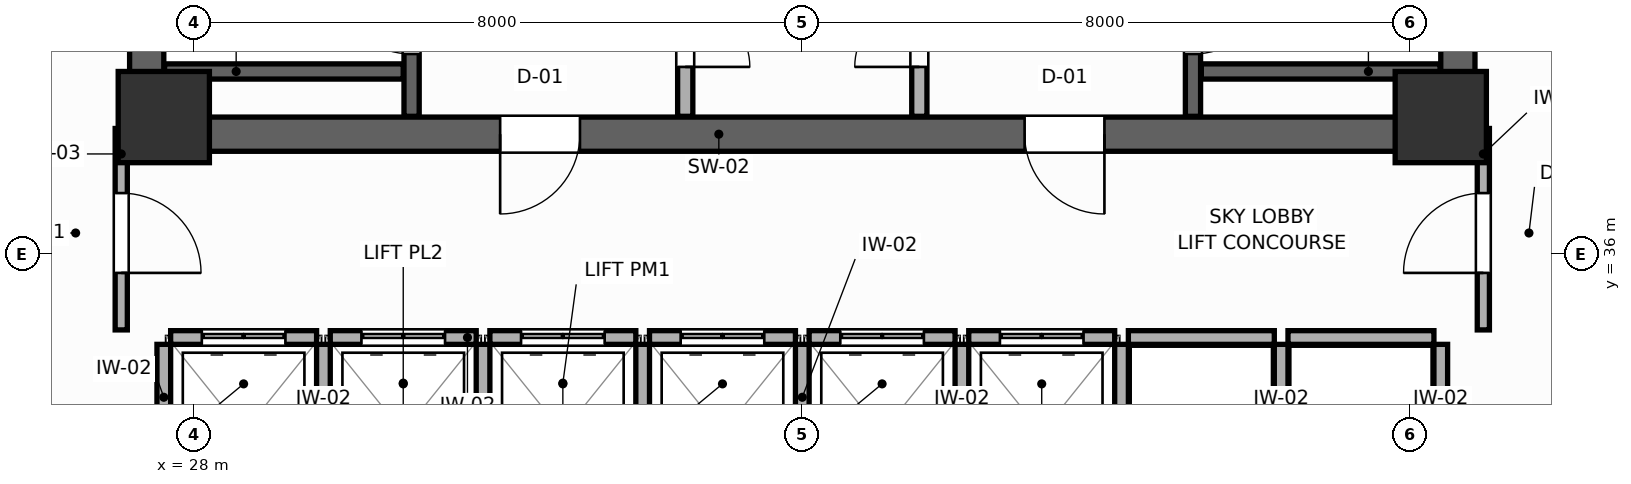
"""IFC4 building model, lengths in metres.
Left out: names, types, materials, properties, quantities, classifications, styles, units other than length and angle.
Written with IfcOpenShell. Run it as: python <this file> out.ifc"""

import sys

from ifc_helpers import new_model, si_unit, direction, frame, frame_2d, origin, origin_2d, place, context, subcontext, project, spatial, rectangle, extrude, source, transform, mapped, element, fill, save


model = new_model("IFC4")
c1 = context("Model", 3, precision=1e-05, world=origin(), true_north=direction((0.0, 1.0)))
c2 = subcontext(c1, "Body", "Model", "MODEL_VIEW")
j1 = project(units=[si_unit("LENGTHUNIT", "METRE"), si_unit("PLANEANGLEUNIT", "RADIAN")], contexts=[c1])
p1 = place(None, origin())
s1 = spatial("IfcSite", under=j1, at=p1, CompositionType="ELEMENT")
p2 = place(p1, origin())
s2 = spatial("IfcBuilding", under=s1, at=p2, CompositionType="ELEMENT")
p3 = place(p2, frame((0.0, 0.0, 99.0)))
s3 = spatial("IfcBuildingStorey", under=s2, at=p3, CompositionType="ELEMENT", Elevation=99.0)
p4 = place(p3, frame((27.15, 37.575, 0.0), z_axis=(0.0, 0.0, 1.0), x_axis=(1.0, 0.0, 0.0)))
e1 = element("IfcWall", 1, at=p4, inside=s3, PredefinedType="SHEAR", context=c2, shape_type="SweptSolid", body=[
    extrude(rectangle(XDim=17.7, YDim=0.45, at=frame_2d((8.85, 0.0))), origin(), (0.0, 0.0, 1.0), 3.6),
])
p5 = place(p4, frame((4.875, 0.0, 0.0)))
e2 = element("IfcOpeningElement", 2, at=p5, cuts=e1, PredefinedType="OPENING", context=c2, shape_type="SweptSolid", body=[
    extrude(rectangle(XDim=1.05, YDim=2.1, at=frame_2d((0.525, 1.05))), frame((0.0, 0.235, 0.0), z_axis=(0.0, -1.0, 0.0), x_axis=(1.0, 0.0, 0.0)), (0.0, 0.0, 1.0), 0.47),
])
p6 = place(p4, frame((11.775, 0.0, 0.0)))
e3 = element("IfcOpeningElement", 3, at=p6, cuts=e1, PredefinedType="OPENING", context=c2, shape_type="SweptSolid", body=[
    extrude(rectangle(XDim=1.05, YDim=2.1, at=frame_2d((0.525, 1.05))), frame((0.0, 0.235, 0.0), z_axis=(0.0, -1.0, 0.0), x_axis=(1.0, 0.0, 0.0)), (0.0, 0.0, 1.0), 0.47),
])
for number, where, z_axis, x_axis in (
    (4, (27.375, 37.8, 0.0), (0.0, 0.0, 1.0), (0.0, 1.0, 0.0)),
    (5, (44.625, 37.8, 0.0), (0.0, 0.0, 1.0), (0.0, 1.0, 0.0)),
):
    element("IfcWall", number, at=place(p3, frame(where, z_axis=z_axis, x_axis=x_axis)), inside=s3, PredefinedType="SHEAR", context=c2, shape_type="SweptSolid", body=[
        extrude(rectangle(XDim=9.0, YDim=0.45, at=frame_2d((4.5, 0.0))), origin(), (0.0, 0.0, 1.0), 3.6),
    ])
m1 = source(origin(), c2, "Body", "SweptSolid", [
    extrude(rectangle(XDim=1.2, YDim=1.2, at=origin_2d()), origin(), (0.0, 0.0, 1.0), 3.6),
])
for number, where, z_axis, x_axis in (
    (6, (27.6, 37.8, 0.0), (0.0, 0.0, 1.0), (1.0, 0.0, 0.0)),
    (7, (44.4, 37.8, 0.0), (0.0, 0.0, 1.0), (1.0, 0.0, 0.0)),
):
    element("IfcColumn", number, at=place(p3, frame(where, z_axis=z_axis, x_axis=x_axis)), inside=s3, PredefinedType="COLUMN", context=c2, shape_type="MappedRepresentation", body=[
        mapped(m1, transform((0.0, 0.0, 0.0), scale=1.0)),
    ])
p7 = place(p3, frame((30.86, 37.81, 0.0), z_axis=(0.0, 0.0, 1.0), x_axis=(0.0, 1.0, 0.0)))
e8 = element("IfcWall", 8, at=p7, inside=s3, PredefinedType="SHEAR", context=c2, shape_type="SweptSolid", body=[
    extrude(rectangle(XDim=8.98, YDim=0.2, at=frame_2d((4.49, 0.0))), origin(), (0.0, 0.0, 1.0), 3.6),
])
p8 = place(p7, frame((0.82, 0.0, 0.0)))
e9 = element("IfcOpeningElement", 9, at=p8, cuts=e8, PredefinedType="OPENING", context=c2, shape_type="SweptSolid", body=[
    extrude(rectangle(XDim=1.05, YDim=2.1, at=frame_2d((0.525, 1.05))), frame((0.0, 0.11, 0.0), z_axis=(0.0, -1.0, 0.0), x_axis=(1.0, 0.0, 0.0)), (0.0, 0.0, 1.0), 0.22),
])
p9 = place(p3, frame((27.61, 38.4, 0.0), z_axis=(0.0, 0.0, 1.0), x_axis=(1.0, 0.0, 0.0)))
e10 = element("IfcWall", 10, at=p9, inside=s3, PredefinedType="SHEAR", context=c2, shape_type="SweptSolid", body=[
    extrude(rectangle(XDim=3.14, YDim=0.2, at=frame_2d((1.57, 0.0))), origin(), (0.0, 0.0, 1.0), 3.6),
])
p10 = place(p3, frame((41.14, 37.81, 0.0), z_axis=(0.0, 0.0, 1.0), x_axis=(0.0, 1.0, 0.0)))
e11 = element("IfcWall", 11, at=p10, inside=s3, PredefinedType="SHEAR", context=c2, shape_type="SweptSolid", body=[
    extrude(rectangle(XDim=8.98, YDim=0.2, at=frame_2d((4.49, 0.0))), origin(), (0.0, 0.0, 1.0), 3.6),
])
p11 = place(p10, frame((0.82, 0.0, 0.0)))
e12 = element("IfcOpeningElement", 12, at=p11, cuts=e11, PredefinedType="OPENING", context=c2, shape_type="SweptSolid", body=[
    extrude(rectangle(XDim=1.05, YDim=2.1, at=frame_2d((0.525, 1.05))), frame((0.0, 0.11, 0.0), z_axis=(0.0, -1.0, 0.0), x_axis=(1.0, 0.0, 0.0)), (0.0, 0.0, 1.0), 0.22),
])
p12 = place(p3, frame((41.25, 38.4, 0.0), z_axis=(0.0, 0.0, 1.0), x_axis=(1.0, 0.0, 0.0)))
e13 = element("IfcWall", 13, at=p12, inside=s3, PredefinedType="SHEAR", context=c2, shape_type="SweptSolid", body=[
    extrude(rectangle(XDim=3.14, YDim=0.2, at=frame_2d((1.57, 0.0))), origin(), (0.0, 0.0, 1.0), 3.6),
])
p13 = place(p3, frame((34.46, 37.81, 0.0), z_axis=(0.0, 0.0, 1.0), x_axis=(0.0, 1.0, 0.0)))
e14 = element("IfcWall", 14, at=p13, inside=s3, PredefinedType="PARTITIONING", context=c2, shape_type="SweptSolid", body=[
    extrude(rectangle(XDim=8.98, YDim=0.2, at=frame_2d((4.49, 0.0))), origin(), (0.0, 0.0, 1.0), 3.4),
])
p14 = place(p13, frame((0.65, 0.0, 0.0)))
e15 = element("IfcOpeningElement", 15, at=p14, cuts=e14, PredefinedType="OPENING", context=c2, shape_type="SweptSolid", body=[
    extrude(rectangle(XDim=0.85, YDim=2.05, at=frame_2d((0.425, 1.025))), frame((0.0, 0.11, 0.0), z_axis=(0.0, -1.0, 0.0), x_axis=(1.0, 0.0, 0.0)), (0.0, 0.0, 1.0), 0.22),
])
p15 = place(p3, frame((37.54, 37.81, 0.0), z_axis=(0.0, 0.0, 1.0), x_axis=(0.0, 1.0, 0.0)))
e16 = element("IfcWall", 16, at=p15, inside=s3, PredefinedType="PARTITIONING", context=c2, shape_type="SweptSolid", body=[
    extrude(rectangle(XDim=8.98, YDim=0.2, at=frame_2d((4.49, 0.0))), origin(), (0.0, 0.0, 1.0), 3.4),
])
p16 = place(p15, frame((0.65, 0.0, 0.0)))
e17 = element("IfcOpeningElement", 17, at=p16, cuts=e16, PredefinedType="OPENING", context=c2, shape_type="SweptSolid", body=[
    extrude(rectangle(XDim=0.85, YDim=2.05, at=frame_2d((0.425, 1.025))), frame((0.0, 0.11, 0.0), z_axis=(0.0, -1.0, 0.0), x_axis=(1.0, 0.0, 0.0)), (0.0, 0.0, 1.0), 0.22),
])
p17 = place(p3, frame((27.69, 34.9, 0.0), z_axis=(0.0, 0.0, 1.0), x_axis=(1.0, 0.0, 0.0)))
e18 = element("IfcWall", 18, at=p17, inside=s3, PredefinedType="PARTITIONING", context=c2, shape_type="SweptSolid", body=[
    extrude(rectangle(XDim=1.92, YDim=0.18, at=frame_2d((0.96, 0.0))), origin(), (0.0, 0.0, 1.0), 3.4),
])
p18 = place(p17, frame((0.41, 0.0, 0.0)))
e19 = element("IfcOpeningElement", 19, at=p18, cuts=e18, PredefinedType="OPENING", context=c2, shape_type="SweptSolid", body=[
    extrude(rectangle(XDim=1.1, YDim=2.1, at=frame_2d((0.55, 1.05))), frame((0.0, 0.1, 0.0), z_axis=(0.0, -1.0, 0.0), x_axis=(1.0, 0.0, 0.0)), (0.0, 0.0, 1.0), 0.2),
])
p19 = place(p3, frame((27.6, 32.49, 0.0), z_axis=(0.0, 0.0, 1.0), x_axis=(0.0, 1.0, 0.0)))
e20 = element("IfcWall", 20, at=p19, inside=s3, PredefinedType="PARTITIONING", context=c2, shape_type="SweptSolid", body=[
    extrude(rectangle(XDim=2.32, YDim=0.18, at=frame_2d((1.16, 0.0))), origin(), (0.0, 0.0, 1.0), 3.4),
])
p20 = place(p3, frame((29.79, 34.9, 0.0), z_axis=(0.0, 0.0, 1.0), x_axis=(1.0, 0.0, 0.0)))
e21 = element("IfcWall", 21, at=p20, inside=s3, PredefinedType="PARTITIONING", context=c2, shape_type="SweptSolid", body=[
    extrude(rectangle(XDim=1.92, YDim=0.18, at=frame_2d((0.96, 0.0))), origin(), (0.0, 0.0, 1.0), 3.4),
])
p21 = place(p20, frame((0.41, 0.0, 0.0)))
e22 = element("IfcOpeningElement", 22, at=p21, cuts=e21, PredefinedType="OPENING", context=c2, shape_type="SweptSolid", body=[
    extrude(rectangle(XDim=1.1, YDim=2.1, at=frame_2d((0.55, 1.05))), frame((0.0, 0.1, 0.0), z_axis=(0.0, -1.0, 0.0), x_axis=(1.0, 0.0, 0.0)), (0.0, 0.0, 1.0), 0.2),
])
p22 = place(p3, frame((29.7, 32.49, 0.0), z_axis=(0.0, 0.0, 1.0), x_axis=(0.0, 1.0, 0.0)))
e23 = element("IfcWall", 23, at=p22, inside=s3, PredefinedType="PARTITIONING", context=c2, shape_type="SweptSolid", body=[
    extrude(rectangle(XDim=2.32, YDim=0.18, at=frame_2d((1.16, 0.0))), origin(), (0.0, 0.0, 1.0), 3.4),
])
p23 = place(p3, frame((31.89, 34.9, 0.0), z_axis=(0.0, 0.0, 1.0), x_axis=(1.0, 0.0, 0.0)))
e24 = element("IfcWall", 24, at=p23, inside=s3, PredefinedType="PARTITIONING", context=c2, shape_type="SweptSolid", body=[
    extrude(rectangle(XDim=1.92, YDim=0.18, at=frame_2d((0.96, 0.0))), origin(), (0.0, 0.0, 1.0), 3.4),
])
p24 = place(p23, frame((0.41, 0.0, 0.0)))
e25 = element("IfcOpeningElement", 25, at=p24, cuts=e24, PredefinedType="OPENING", context=c2, shape_type="SweptSolid", body=[
    extrude(rectangle(XDim=1.1, YDim=2.1, at=frame_2d((0.55, 1.05))), frame((0.0, 0.1, 0.0), z_axis=(0.0, -1.0, 0.0), x_axis=(1.0, 0.0, 0.0)), (0.0, 0.0, 1.0), 0.2),
])
p25 = place(p3, frame((31.8, 32.49, 0.0), z_axis=(0.0, 0.0, 1.0), x_axis=(0.0, 1.0, 0.0)))
e26 = element("IfcWall", 26, at=p25, inside=s3, PredefinedType="PARTITIONING", context=c2, shape_type="SweptSolid", body=[
    extrude(rectangle(XDim=2.32, YDim=0.18, at=frame_2d((1.16, 0.0))), origin(), (0.0, 0.0, 1.0), 3.4),
])
p26 = place(p3, frame((33.99, 34.9, 0.0), z_axis=(0.0, 0.0, 1.0), x_axis=(1.0, 0.0, 0.0)))
e27 = element("IfcWall", 27, at=p26, inside=s3, PredefinedType="PARTITIONING", context=c2, shape_type="SweptSolid", body=[
    extrude(rectangle(XDim=1.92, YDim=0.18, at=frame_2d((0.96, 0.0))), origin(), (0.0, 0.0, 1.0), 3.4),
])
p27 = place(p26, frame((0.41, 0.0, 0.0)))
e28 = element("IfcOpeningElement", 28, at=p27, cuts=e27, PredefinedType="OPENING", context=c2, shape_type="SweptSolid", body=[
    extrude(rectangle(XDim=1.1, YDim=2.1, at=frame_2d((0.55, 1.05))), frame((0.0, 0.1, 0.0), z_axis=(0.0, -1.0, 0.0), x_axis=(1.0, 0.0, 0.0)), (0.0, 0.0, 1.0), 0.2),
])
p28 = place(p3, frame((33.9, 32.49, 0.0), z_axis=(0.0, 0.0, 1.0), x_axis=(0.0, 1.0, 0.0)))
e29 = element("IfcWall", 29, at=p28, inside=s3, PredefinedType="PARTITIONING", context=c2, shape_type="SweptSolid", body=[
    extrude(rectangle(XDim=2.32, YDim=0.18, at=frame_2d((1.16, 0.0))), origin(), (0.0, 0.0, 1.0), 3.4),
])
p29 = place(p3, frame((36.09, 34.9, 0.0), z_axis=(0.0, 0.0, 1.0), x_axis=(1.0, 0.0, 0.0)))
e30 = element("IfcWall", 30, at=p29, inside=s3, PredefinedType="PARTITIONING", context=c2, shape_type="SweptSolid", body=[
    extrude(rectangle(XDim=1.92, YDim=0.18, at=frame_2d((0.96, 0.0))), origin(), (0.0, 0.0, 1.0), 3.4),
])
p30 = place(p29, frame((0.41, 0.0, 0.0)))
e31 = element("IfcOpeningElement", 31, at=p30, cuts=e30, PredefinedType="OPENING", context=c2, shape_type="SweptSolid", body=[
    extrude(rectangle(XDim=1.1, YDim=2.1, at=frame_2d((0.55, 1.05))), frame((0.0, 0.1, 0.0), z_axis=(0.0, -1.0, 0.0), x_axis=(1.0, 0.0, 0.0)), (0.0, 0.0, 1.0), 0.2),
])
p31 = place(p3, frame((36.0, 32.49, 0.0), z_axis=(0.0, 0.0, 1.0), x_axis=(0.0, 1.0, 0.0)))
e32 = element("IfcWall", 32, at=p31, inside=s3, PredefinedType="PARTITIONING", context=c2, shape_type="SweptSolid", body=[
    extrude(rectangle(XDim=2.32, YDim=0.18, at=frame_2d((1.16, 0.0))), origin(), (0.0, 0.0, 1.0), 3.4),
])
p32 = place(p3, frame((38.19, 34.9, 0.0), z_axis=(0.0, 0.0, 1.0), x_axis=(1.0, 0.0, 0.0)))
e33 = element("IfcWall", 33, at=p32, inside=s3, PredefinedType="PARTITIONING", context=c2, shape_type="SweptSolid", body=[
    extrude(rectangle(XDim=1.92, YDim=0.18, at=frame_2d((0.96, 0.0))), origin(), (0.0, 0.0, 1.0), 3.4),
])
p33 = place(p32, frame((0.41, 0.0, 0.0)))
e34 = element("IfcOpeningElement", 34, at=p33, cuts=e33, PredefinedType="OPENING", context=c2, shape_type="SweptSolid", body=[
    extrude(rectangle(XDim=1.1, YDim=2.1, at=frame_2d((0.55, 1.05))), frame((0.0, 0.1, 0.0), z_axis=(0.0, -1.0, 0.0), x_axis=(1.0, 0.0, 0.0)), (0.0, 0.0, 1.0), 0.2),
])
p34 = place(p3, frame((38.1, 32.49, 0.0), z_axis=(0.0, 0.0, 1.0), x_axis=(0.0, 1.0, 0.0)))
e35 = element("IfcWall", 35, at=p34, inside=s3, PredefinedType="PARTITIONING", context=c2, shape_type="SweptSolid", body=[
    extrude(rectangle(XDim=2.32, YDim=0.18, at=frame_2d((1.16, 0.0))), origin(), (0.0, 0.0, 1.0), 3.4),
])
p35 = place(p3, frame((40.29, 34.9, 0.0), z_axis=(0.0, 0.0, 1.0), x_axis=(1.0, 0.0, 0.0)))
e36 = element("IfcWall", 36, at=p35, inside=s3, PredefinedType="PARTITIONING", context=c2, shape_type="SweptSolid", body=[
    extrude(rectangle(XDim=1.92, YDim=0.18, at=frame_2d((0.96, 0.0))), origin(), (0.0, 0.0, 1.0), 3.4),
])
p36 = place(p3, frame((40.2, 32.49, 0.0), z_axis=(0.0, 0.0, 1.0), x_axis=(0.0, 1.0, 0.0)))
e37 = element("IfcWall", 37, at=p36, inside=s3, PredefinedType="PARTITIONING", context=c2, shape_type="SweptSolid", body=[
    extrude(rectangle(XDim=2.32, YDim=0.18, at=frame_2d((1.16, 0.0))), origin(), (0.0, 0.0, 1.0), 3.4),
])
p37 = place(p3, frame((42.39, 34.9, 0.0), z_axis=(0.0, 0.0, 1.0), x_axis=(1.0, 0.0, 0.0)))
e38 = element("IfcWall", 38, at=p37, inside=s3, PredefinedType="PARTITIONING", context=c2, shape_type="SweptSolid", body=[
    extrude(rectangle(XDim=1.92, YDim=0.18, at=frame_2d((0.96, 0.0))), origin(), (0.0, 0.0, 1.0), 3.4),
])
for number, where, z_axis, x_axis in (
    (39, (42.3, 32.49, 0.0), (0.0, 0.0, 1.0), (0.0, 1.0, 0.0)),
    (40, (44.4, 32.49, 0.0), (0.0, 0.0, 1.0), (0.0, 1.0, 0.0)),
):
    element("IfcWall", number, at=place(p3, frame(where, z_axis=z_axis, x_axis=x_axis)), inside=s3, PredefinedType="PARTITIONING", context=c2, shape_type="SweptSolid", body=[
        extrude(rectangle(XDim=2.32, YDim=0.18, at=frame_2d((1.16, 0.0))), origin(), (0.0, 0.0, 1.0), 3.4),
    ])
p38 = place(p3, frame((27.04, 35.0, 0.0), z_axis=(0.0, 0.0, 1.0), x_axis=(0.0, 1.0, 0.0)))
e41 = element("IfcWall", 41, at=p38, inside=s3, PredefinedType="PARTITIONING", context=c2, shape_type="SweptSolid", body=[
    extrude(rectangle(XDim=2.65, YDim=0.16, at=frame_2d((1.325, 0.0))), origin(), (0.0, 0.0, 1.0), 3.4),
])
p39 = place(p38, frame((0.75, 0.0, 0.0)))
e42 = element("IfcOpeningElement", 42, at=p39, cuts=e41, PredefinedType="OPENING", context=c2, shape_type="SweptSolid", body=[
    extrude(rectangle(XDim=1.05, YDim=2.1, at=frame_2d((0.525, 1.05))), frame((0.0, 0.09, 0.0), z_axis=(0.0, -1.0, 0.0), x_axis=(1.0, 0.0, 0.0)), (0.0, 0.0, 1.0), 0.18),
])
p40 = place(p3, frame((44.96, 35.0, 0.0), z_axis=(0.0, 0.0, 1.0), x_axis=(0.0, 1.0, 0.0)))
e43 = element("IfcWall", 43, at=p40, inside=s3, PredefinedType="PARTITIONING", context=c2, shape_type="SweptSolid", body=[
    extrude(rectangle(XDim=2.65, YDim=0.16, at=frame_2d((1.325, 0.0))), origin(), (0.0, 0.0, 1.0), 3.4),
])
p41 = place(p40, frame((0.75, 0.0, 0.0)))
e44 = element("IfcOpeningElement", 44, at=p41, cuts=e43, PredefinedType="OPENING", context=c2, shape_type="SweptSolid", body=[
    extrude(rectangle(XDim=1.05, YDim=2.1, at=frame_2d((0.525, 1.05))), frame((0.0, 0.09, 0.0), z_axis=(0.0, -1.0, 0.0), x_axis=(1.0, 0.0, 0.0)), (0.0, 0.0, 1.0), 0.18),
])
p42 = place(p8, origin())
e45 = element("IfcDoor", 45, at=p42, inside=s3, OperationType="SINGLE_SWING_RIGHT", PredefinedType="DOOR", context=c2, shape_type="SweptSolid", body=[
    extrude(rectangle(XDim=1.05, YDim=2.1, at=frame_2d((0.525, 1.05))), frame((0.0, 0.025, 0.0), z_axis=(0.0, -1.0, 0.0), x_axis=(1.0, 0.0, 0.0)), (0.0, 0.0, 1.0), 0.05),
])
fill(e9, e45)
p43 = place(p11, frame((1.05, 0.0, 0.0), z_axis=(0.0, 0.0, 1.0), x_axis=(-1.0, 0.0, 0.0)))
e46 = element("IfcDoor", 46, at=p43, inside=s3, OperationType="SINGLE_SWING_LEFT", PredefinedType="DOOR", context=c2, shape_type="SweptSolid", body=[
    extrude(rectangle(XDim=1.05, YDim=2.1, at=frame_2d((0.525, 1.05))), frame((0.0, 0.025, 0.0), z_axis=(0.0, -1.0, 0.0), x_axis=(1.0, 0.0, 0.0)), (0.0, 0.0, 1.0), 0.05),
])
fill(e12, e46)
p44 = place(p14, frame((0.85, 0.0, 0.0), z_axis=(0.0, 0.0, 1.0), x_axis=(-1.0, 0.0, 0.0)))
e47 = element("IfcDoor", 47, at=p44, inside=s3, OperationType="SINGLE_SWING_RIGHT", PredefinedType="DOOR", context=c2, shape_type="SweptSolid", body=[
    extrude(rectangle(XDim=0.85, YDim=2.05, at=frame_2d((0.425, 1.025))), frame((0.0, 0.025, 0.0), z_axis=(0.0, -1.0, 0.0), x_axis=(1.0, 0.0, 0.0)), (0.0, 0.0, 1.0), 0.05),
])
fill(e15, e47)
p45 = place(p16, origin())
e48 = element("IfcDoor", 48, at=p45, inside=s3, OperationType="SINGLE_SWING_LEFT", PredefinedType="DOOR", context=c2, shape_type="SweptSolid", body=[
    extrude(rectangle(XDim=0.85, YDim=2.05, at=frame_2d((0.425, 1.025))), frame((0.0, 0.025, 0.0), z_axis=(0.0, -1.0, 0.0), x_axis=(1.0, 0.0, 0.0)), (0.0, 0.0, 1.0), 0.05),
])
fill(e17, e48)
p46 = place(p18, origin())
e49 = element("IfcDoor", 49, at=p46, inside=s3, OperationType="DOUBLE_DOOR_SLIDING", PredefinedType="DOOR", context=c2, shape_type="SweptSolid", body=[
    extrude(rectangle(XDim=1.1, YDim=2.1, at=frame_2d((0.55, 1.05))), frame((0.0, 0.025, 0.0), z_axis=(0.0, -1.0, 0.0), x_axis=(1.0, 0.0, 0.0)), (0.0, 0.0, 1.0), 0.05),
])
fill(e19, e49)
p47 = place(p21, origin())
e50 = element("IfcDoor", 50, at=p47, inside=s3, OperationType="DOUBLE_DOOR_SLIDING", PredefinedType="DOOR", context=c2, shape_type="SweptSolid", body=[
    extrude(rectangle(XDim=1.1, YDim=2.1, at=frame_2d((0.55, 1.05))), frame((0.0, 0.025, 0.0), z_axis=(0.0, -1.0, 0.0), x_axis=(1.0, 0.0, 0.0)), (0.0, 0.0, 1.0), 0.05),
])
fill(e22, e50)
p48 = place(p24, origin())
e51 = element("IfcDoor", 51, at=p48, inside=s3, OperationType="DOUBLE_DOOR_SLIDING", PredefinedType="DOOR", context=c2, shape_type="SweptSolid", body=[
    extrude(rectangle(XDim=1.1, YDim=2.1, at=frame_2d((0.55, 1.05))), frame((0.0, 0.025, 0.0), z_axis=(0.0, -1.0, 0.0), x_axis=(1.0, 0.0, 0.0)), (0.0, 0.0, 1.0), 0.05),
])
fill(e25, e51)
p49 = place(p27, origin())
e52 = element("IfcDoor", 52, at=p49, inside=s3, OperationType="DOUBLE_DOOR_SLIDING", PredefinedType="DOOR", context=c2, shape_type="SweptSolid", body=[
    extrude(rectangle(XDim=1.1, YDim=2.1, at=frame_2d((0.55, 1.05))), frame((0.0, 0.025, 0.0), z_axis=(0.0, -1.0, 0.0), x_axis=(1.0, 0.0, 0.0)), (0.0, 0.0, 1.0), 0.05),
])
fill(e28, e52)
p50 = place(p30, origin())
e53 = element("IfcDoor", 53, at=p50, inside=s3, OperationType="DOUBLE_DOOR_SLIDING", PredefinedType="DOOR", context=c2, shape_type="SweptSolid", body=[
    extrude(rectangle(XDim=1.1, YDim=2.1, at=frame_2d((0.55, 1.05))), frame((0.0, 0.025, 0.0), z_axis=(0.0, -1.0, 0.0), x_axis=(1.0, 0.0, 0.0)), (0.0, 0.0, 1.0), 0.05),
])
fill(e31, e53)
p51 = place(p33, origin())
e54 = element("IfcDoor", 54, at=p51, inside=s3, OperationType="DOUBLE_DOOR_SLIDING", PredefinedType="DOOR", context=c2, shape_type="SweptSolid", body=[
    extrude(rectangle(XDim=1.1, YDim=2.1, at=frame_2d((0.55, 1.05))), frame((0.0, 0.025, 0.0), z_axis=(0.0, -1.0, 0.0), x_axis=(1.0, 0.0, 0.0)), (0.0, 0.0, 1.0), 0.05),
])
fill(e34, e54)
p52 = place(p39, frame((1.05, 0.0, 0.0), z_axis=(0.0, 0.0, 1.0), x_axis=(-1.0, 0.0, 0.0)))
e55 = element("IfcDoor", 55, at=p52, inside=s3, OperationType="SINGLE_SWING_RIGHT", PredefinedType="DOOR", context=c2, shape_type="SweptSolid", body=[
    extrude(rectangle(XDim=1.05, YDim=2.1, at=frame_2d((0.525, 1.05))), frame((0.0, 0.025, 0.0), z_axis=(0.0, -1.0, 0.0), x_axis=(1.0, 0.0, 0.0)), (0.0, 0.0, 1.0), 0.05),
])
fill(e42, e55)
p53 = place(p41, origin())
e56 = element("IfcDoor", 56, at=p53, inside=s3, OperationType="SINGLE_SWING_LEFT", PredefinedType="DOOR", context=c2, shape_type="SweptSolid", body=[
    extrude(rectangle(XDim=1.05, YDim=2.1, at=frame_2d((0.525, 1.05))), frame((0.0, 0.025, 0.0), z_axis=(0.0, -1.0, 0.0), x_axis=(1.0, 0.0, 0.0)), (0.0, 0.0, 1.0), 0.05),
])
fill(e44, e56)
p54 = place(p5, frame((1.05, 0.0, 0.0), z_axis=(0.0, 0.0, 1.0), x_axis=(-1.0, 0.0, 0.0)))
e57 = element("IfcDoor", 57, at=p54, inside=s3, OperationType="SINGLE_SWING_RIGHT", PredefinedType="DOOR", context=c2, shape_type="SweptSolid", body=[
    extrude(rectangle(XDim=1.05, YDim=2.1, at=frame_2d((0.525, 1.05))), frame((0.0, 0.025, 0.0), z_axis=(0.0, -1.0, 0.0), x_axis=(1.0, 0.0, 0.0)), (0.0, 0.0, 1.0), 0.05),
])
fill(e2, e57)
p55 = place(p6, frame((1.05, 0.0, 0.0), z_axis=(0.0, 0.0, 1.0), x_axis=(-1.0, 0.0, 0.0)))
e58 = element("IfcDoor", 58, at=p55, inside=s3, OperationType="SINGLE_SWING_LEFT", PredefinedType="DOOR", context=c2, shape_type="SweptSolid", body=[
    extrude(rectangle(XDim=1.05, YDim=2.1, at=frame_2d((0.525, 1.05))), frame((0.0, 0.025, 0.0), z_axis=(0.0, -1.0, 0.0), x_axis=(1.0, 0.0, 0.0)), (0.0, 0.0, 1.0), 0.05),
])
fill(e3, e58)
save(model, sys.argv[1])
